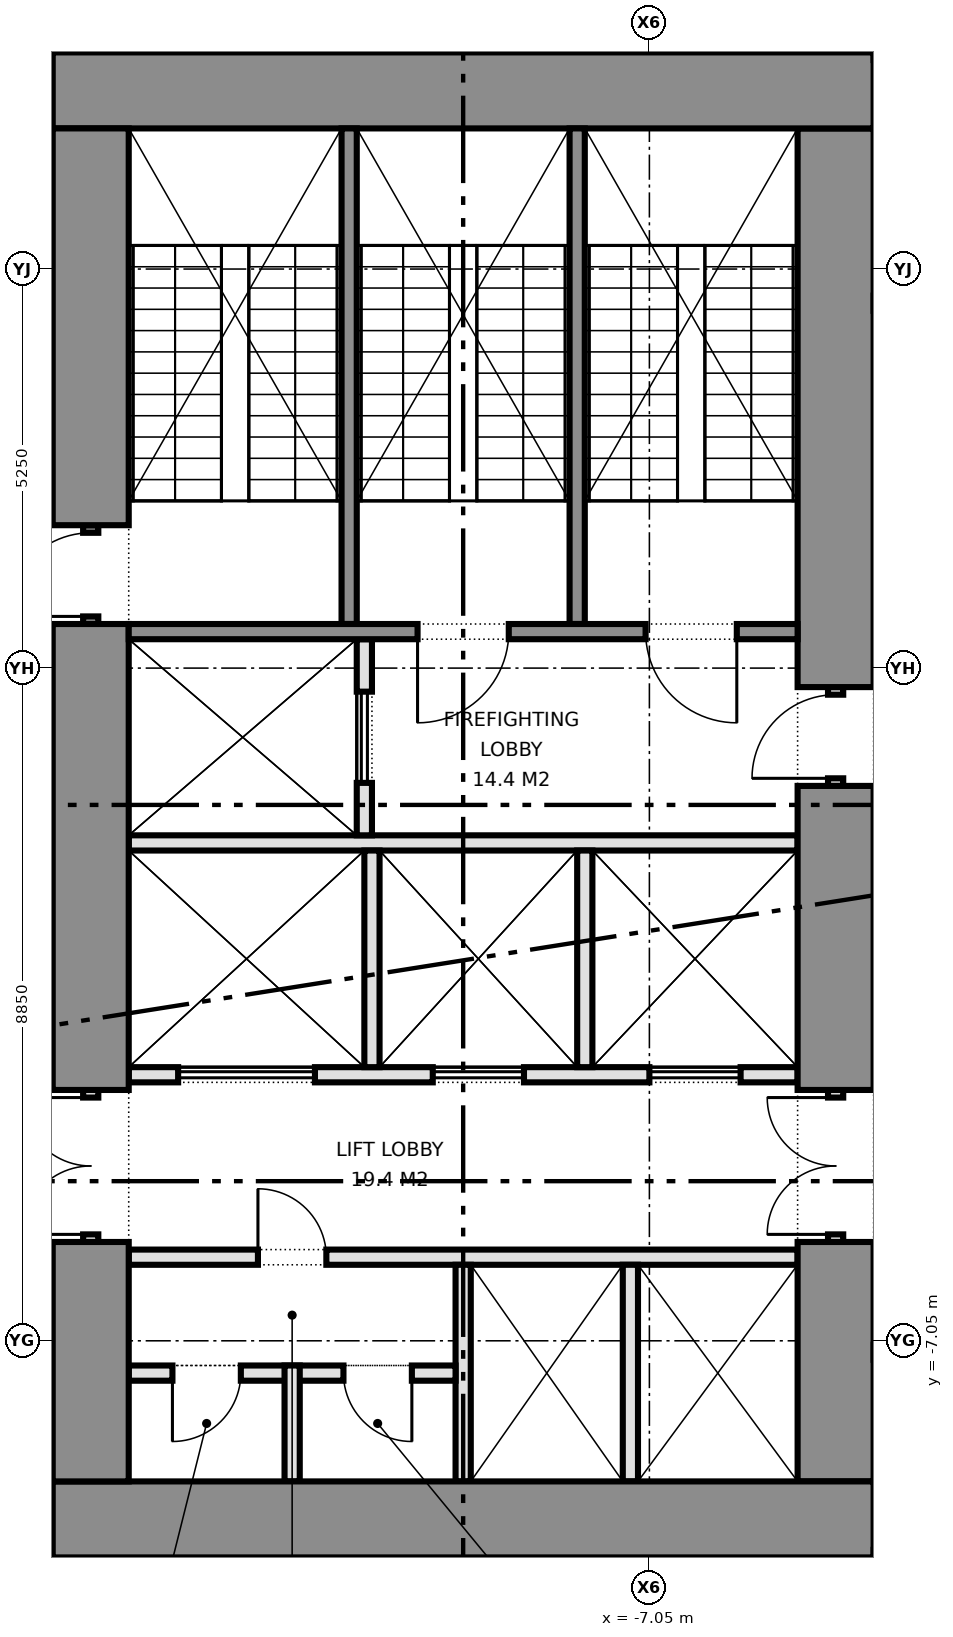
"""IFC4 building model, lengths in metres.
Left out: names, types, materials, properties, quantities, classifications, styles, units other than length and angle.
Written with IfcOpenShell. Run it as: python <this file> out.ifc"""

import sys

from ifc_helpers import new_model, si_unit, direction, frame, frame_2d, origin, place, context, subcontext, project, spatial, rectangle, extrude, element, fill, save


model = new_model("IFC4")
c1 = context("Model", 3, precision=1e-05, world=origin(), true_north=direction((0.0, 1.0)))
c2 = subcontext(c1, "Body", "Model", "MODEL_VIEW")
j1 = project(units=[si_unit("LENGTHUNIT", "METRE"), si_unit("PLANEANGLEUNIT", "RADIAN")], contexts=[c1])
p1 = place(None, origin())
s1 = spatial("IfcSite", under=j1, at=p1, CompositionType="ELEMENT")
p2 = place(p1, origin())
s2 = spatial("IfcBuilding", under=s1, at=p2, CompositionType="ELEMENT")
p3 = place(p2, frame((0.0, 0.0, 108.4)))
s3 = spatial("IfcBuildingStorey", under=s2, at=p3, CompositionType="ELEMENT", Elevation=108.4)
for number, where, z_axis, x_axis in (
    (1, (-14.9, -9.4, 0.0), (0.0, 0.0, 1.0), (1.0, 0.0, 0.0)),
    (2, (-14.9, 9.4, 0.0), (0.0, 0.0, 1.0), (1.0, 0.0, 0.0)),
):
    element("IfcWall", number, at=place(p3, frame(where, z_axis=z_axis, x_axis=x_axis)), inside=s3, PredefinedType="SHEAR", context=c2, shape_type="SweptSolid", body=[
        extrude(rectangle(XDim=10.8, YDim=1.0, at=frame_2d((5.4, 0.0))), origin(), (0.0, 0.0, 1.0), 4.15),
    ])
p4 = place(p3, frame((-14.4, -8.9, 0.0), z_axis=(0.0, 0.0, 1.0), x_axis=(0.0, 1.0, 0.0)))
e3 = element("IfcWall", 3, at=p4, inside=s3, PredefinedType="SHEAR", context=c2, shape_type="SweptSolid", body=[
    extrude(rectangle(XDim=3.15, YDim=1.0, at=frame_2d((1.575, 0.0))), origin(), (0.0, 0.0, 1.0), 4.15),
])
p5 = place(p3, frame((-14.4, -5.75, 0.0), z_axis=(0.0, 0.0, 1.0), x_axis=(0.0, 1.0, 0.0)))
e4 = element("IfcWall", 4, at=p5, inside=s3, PredefinedType="PARTITIONING", context=c2, shape_type="SweptSolid", body=[
    extrude(rectangle(XDim=2.0, YDim=0.2, at=frame_2d((1.0, 0.0))), origin(), (0.0, 0.0, 1.0), 2.4),
])
p6 = place(p5, frame((0.1, 0.0, 0.0)))
e5 = element("IfcOpeningElement", 5, at=p6, cuts=e4, PredefinedType="OPENING", context=c2, shape_type="SweptSolid", body=[
    extrude(rectangle(XDim=1.8, YDim=2.1, at=frame_2d((0.9, 1.05))), frame((0.0, 0.11, 0.0), z_axis=(0.0, -1.0, 0.0), x_axis=(1.0, 0.0, 0.0)), (0.0, 0.0, 1.0), 0.22),
])
p7 = place(p3, frame((-14.4, -3.75, 0.0), z_axis=(0.0, 0.0, 1.0), x_axis=(0.0, 1.0, 0.0)))
e6 = element("IfcWall", 6, at=p7, inside=s3, PredefinedType="SHEAR", context=c2, shape_type="SweptSolid", body=[
    extrude(rectangle(XDim=6.13, YDim=1.0, at=frame_2d((3.065, 0.0))), origin(), (0.0, 0.0, 1.0), 4.15),
])
p8 = place(p3, frame((-14.4, 2.38, 0.0), z_axis=(0.0, 0.0, 1.0), x_axis=(0.0, 1.0, 0.0)))
e7 = element("IfcWall", 7, at=p8, inside=s3, PredefinedType="SHEAR", context=c2, shape_type="SweptSolid", body=[
    extrude(rectangle(XDim=1.3, YDim=0.2, at=frame_2d((0.65, 0.0))), origin(), (0.0, 0.0, 1.0), 2.4),
])
p9 = place(p8, frame((0.1, 0.0, 0.0)))
e8 = element("IfcOpeningElement", 8, at=p9, cuts=e7, PredefinedType="OPENING", context=c2, shape_type="SweptSolid", body=[
    extrude(rectangle(XDim=1.1, YDim=2.1, at=frame_2d((0.55, 1.05))), frame((0.0, 0.11, 0.0), z_axis=(0.0, -1.0, 0.0), x_axis=(1.0, 0.0, 0.0)), (0.0, 0.0, 1.0), 0.22),
])
p10 = place(p3, frame((-14.4, 3.68, 0.0), z_axis=(0.0, 0.0, 1.0), x_axis=(0.0, 1.0, 0.0)))
e9 = element("IfcWall", 9, at=p10, inside=s3, PredefinedType="SHEAR", context=c2, shape_type="SweptSolid", body=[
    extrude(rectangle(XDim=5.22, YDim=1.0, at=frame_2d((2.61, 0.0))), origin(), (0.0, 0.0, 1.0), 4.15),
])
p11 = place(p3, frame((-4.6, -8.9, 0.0), z_axis=(0.0, 0.0, 1.0), x_axis=(0.0, 1.0, 0.0)))
e10 = element("IfcWall", 10, at=p11, inside=s3, PredefinedType="SHEAR", context=c2, shape_type="SweptSolid", body=[
    extrude(rectangle(XDim=3.15, YDim=1.0, at=frame_2d((1.575, 0.0))), origin(), (0.0, 0.0, 1.0), 4.15),
])
p12 = place(p3, frame((-4.6, -5.75, 0.0), z_axis=(0.0, 0.0, 1.0), x_axis=(0.0, 1.0, 0.0)))
e11 = element("IfcWall", 11, at=p12, inside=s3, PredefinedType="PARTITIONING", context=c2, shape_type="SweptSolid", body=[
    extrude(rectangle(XDim=2.0, YDim=0.2, at=frame_2d((1.0, 0.0))), origin(), (0.0, 0.0, 1.0), 2.4),
])
p13 = place(p12, frame((0.1, 0.0, 0.0)))
e12 = element("IfcOpeningElement", 12, at=p13, cuts=e11, PredefinedType="OPENING", context=c2, shape_type="SweptSolid", body=[
    extrude(rectangle(XDim=1.8, YDim=2.1, at=frame_2d((0.9, 1.05))), frame((0.0, 0.11, 0.0), z_axis=(0.0, -1.0, 0.0), x_axis=(1.0, 0.0, 0.0)), (0.0, 0.0, 1.0), 0.22),
])
p14 = place(p3, frame((-4.6, -3.75, 0.0), z_axis=(0.0, 0.0, 1.0), x_axis=(0.0, 1.0, 0.0)))
e13 = element("IfcWall", 13, at=p14, inside=s3, PredefinedType="SHEAR", context=c2, shape_type="SweptSolid", body=[
    extrude(rectangle(XDim=4.0, YDim=1.0, at=frame_2d((2.0, 0.0))), origin(), (0.0, 0.0, 1.0), 4.15),
])
p15 = place(p3, frame((-4.6, 0.25, 0.0), z_axis=(0.0, 0.0, 1.0), x_axis=(0.0, 1.0, 0.0)))
e14 = element("IfcWall", 14, at=p15, inside=s3, PredefinedType="PARTITIONING", context=c2, shape_type="SweptSolid", body=[
    extrude(rectangle(XDim=1.3, YDim=0.2, at=frame_2d((0.65, 0.0))), origin(), (0.0, 0.0, 1.0), 2.4),
])
p16 = place(p15, frame((0.1, 0.0, 0.0)))
e15 = element("IfcOpeningElement", 15, at=p16, cuts=e14, PredefinedType="OPENING", context=c2, shape_type="SweptSolid", body=[
    extrude(rectangle(XDim=1.1, YDim=2.1, at=frame_2d((0.55, 1.05))), frame((0.0, 0.11, 0.0), z_axis=(0.0, -1.0, 0.0), x_axis=(1.0, 0.0, 0.0)), (0.0, 0.0, 1.0), 0.22),
])
p17 = place(p3, frame((-4.6, 1.55, 0.0), z_axis=(0.0, 0.0, 1.0), x_axis=(0.0, 1.0, 0.0)))
e16 = element("IfcWall", 16, at=p17, inside=s3, PredefinedType="SHEAR", context=c2, shape_type="SweptSolid", body=[
    extrude(rectangle(XDim=7.35, YDim=1.0, at=frame_2d((3.675, 0.0))), origin(), (0.0, 0.0, 1.0), 4.15),
])
p18 = place(p3, frame((-13.9, -5.95, 0.0), z_axis=(0.0, 0.0, 1.0), x_axis=(1.0, 0.0, 0.0)))
e17 = element("IfcWall", 17, at=p18, inside=s3, PredefinedType="PARTITIONING", context=c2, shape_type="SweptSolid", body=[
    extrude(rectangle(XDim=8.8, YDim=0.2, at=frame_2d((4.4, 0.0))), origin(), (0.0, 0.0, 1.0), 4.15),
])
p19 = place(p18, frame((1.7, 0.0, 0.0)))
e18 = element("IfcOpeningElement", 18, at=p19, cuts=e17, PredefinedType="OPENING", context=c2, shape_type="SweptSolid", body=[
    extrude(rectangle(XDim=0.9, YDim=2.1, at=frame_2d((0.45, 1.05))), frame((0.0, 0.11, 0.0), z_axis=(0.0, -1.0, 0.0), x_axis=(1.0, 0.0, 0.0)), (0.0, 0.0, 1.0), 0.22),
])
p20 = place(p3, frame((-13.9, -3.55, 0.0), z_axis=(0.0, 0.0, 1.0), x_axis=(1.0, 0.0, 0.0)))
e19 = element("IfcWall", 19, at=p20, inside=s3, PredefinedType="PARTITIONING", context=c2, shape_type="SweptSolid", body=[
    extrude(rectangle(XDim=8.8, YDim=0.2, at=frame_2d((4.4, 0.0))), origin(), (0.0, 0.0, 1.0), 4.15),
])
p21 = place(p20, frame((0.65, 0.0, 0.0)))
e20 = element("IfcOpeningElement", 20, at=p21, cuts=e19, PredefinedType="OPENING", context=c2, shape_type="SweptSolid", body=[
    extrude(rectangle(XDim=1.8, YDim=2.1, at=frame_2d((0.9, 1.05))), frame((0.0, 0.11, 0.0), z_axis=(0.0, -1.0, 0.0), x_axis=(1.0, 0.0, 0.0)), (0.0, 0.0, 1.0), 0.22),
])
p22 = place(p20, frame((4.0, 0.0, 0.0)))
e21 = element("IfcOpeningElement", 21, at=p22, cuts=e19, PredefinedType="OPENING", context=c2, shape_type="SweptSolid", body=[
    extrude(rectangle(XDim=1.2, YDim=2.1, at=frame_2d((0.6, 1.05))), frame((0.0, 0.11, 0.0), z_axis=(0.0, -1.0, 0.0), x_axis=(1.0, 0.0, 0.0)), (0.0, 0.0, 1.0), 0.22),
])
p23 = place(p20, frame((6.85, 0.0, 0.0)))
e22 = element("IfcOpeningElement", 22, at=p23, cuts=e19, PredefinedType="OPENING", context=c2, shape_type="SweptSolid", body=[
    extrude(rectangle(XDim=1.2, YDim=2.1, at=frame_2d((0.6, 1.05))), frame((0.0, 0.11, 0.0), z_axis=(0.0, -1.0, 0.0), x_axis=(1.0, 0.0, 0.0)), (0.0, 0.0, 1.0), 0.22),
])
p24 = place(p3, frame((-13.9, -0.5, 0.0), z_axis=(0.0, 0.0, 1.0), x_axis=(1.0, 0.0, 0.0)))
e23 = element("IfcWall", 23, at=p24, inside=s3, PredefinedType="PARTITIONING", context=c2, shape_type="SweptSolid", body=[
    extrude(rectangle(XDim=8.8, YDim=0.2, at=frame_2d((4.4, 0.0))), origin(), (0.0, 0.0, 1.0), 4.15),
])
p25 = place(p3, frame((-10.8, -0.4, 0.0), z_axis=(0.0, 0.0, 1.0), x_axis=(0.0, 1.0, 0.0)))
e24 = element("IfcWall", 24, at=p25, inside=s3, PredefinedType="PARTITIONING", context=c2, shape_type="SweptSolid", body=[
    extrude(rectangle(XDim=2.58, YDim=0.2, at=frame_2d((1.29, 0.0))), origin(), (0.0, 0.0, 1.0), 4.15),
])
p26 = place(p25, frame((0.69, 0.0, 0.0)))
e25 = element("IfcOpeningElement", 25, at=p26, cuts=e24, PredefinedType="OPENING", context=c2, shape_type="SweptSolid", body=[
    extrude(rectangle(XDim=1.2, YDim=2.1, at=frame_2d((0.6, 1.05))), frame((0.0, 0.11, 0.0), z_axis=(0.0, -1.0, 0.0), x_axis=(1.0, 0.0, 0.0)), (0.0, 0.0, 1.0), 0.22),
])
p27 = place(p3, frame((-13.9, 2.28, 0.0), z_axis=(0.0, 0.0, 1.0), x_axis=(1.0, 0.0, 0.0)))
e26 = element("IfcWall", 26, at=p27, inside=s3, PredefinedType="SHEAR", context=c2, shape_type="SweptSolid", body=[
    extrude(rectangle(XDim=8.8, YDim=0.2, at=frame_2d((4.4, 0.0))), origin(), (0.0, 0.0, 1.0), 4.15),
])
p28 = place(p27, frame((3.8, 0.0, 0.0)))
e27 = element("IfcOpeningElement", 27, at=p28, cuts=e26, PredefinedType="OPENING", context=c2, shape_type="SweptSolid", body=[
    extrude(rectangle(XDim=1.2, YDim=2.1, at=frame_2d((0.6, 1.05))), frame((0.0, 0.11, 0.0), z_axis=(0.0, -1.0, 0.0), x_axis=(1.0, 0.0, 0.0)), (0.0, 0.0, 1.0), 0.22),
])
p29 = place(p27, frame((6.8, 0.0, 0.0)))
e28 = element("IfcOpeningElement", 28, at=p29, cuts=e26, PredefinedType="OPENING", context=c2, shape_type="SweptSolid", body=[
    extrude(rectangle(XDim=1.2, YDim=2.1, at=frame_2d((0.6, 1.05))), frame((0.0, 0.11, 0.0), z_axis=(0.0, -1.0, 0.0), x_axis=(1.0, 0.0, 0.0)), (0.0, 0.0, 1.0), 0.22),
])
for number, where, z_axis, x_axis in (
    (29, (-11.0, 2.38, 0.0), (0.0, 0.0, 1.0), (0.0, 1.0, 0.0)),
    (30, (-8.0, 2.38, 0.0), (0.0, 0.0, 1.0), (0.0, 1.0, 0.0)),
):
    element("IfcWall", number, at=place(p3, frame(where, z_axis=z_axis, x_axis=x_axis)), inside=s3, PredefinedType="SHEAR", context=c2, shape_type="SweptSolid", body=[
        extrude(rectangle(XDim=6.52, YDim=0.2, at=frame_2d((3.26, 0.0))), origin(), (0.0, 0.0, 1.0), 4.15),
    ])
for number, where, z_axis, x_axis in (
    (31, (-9.5, -8.9, 0.0), (0.0, 0.0, 1.0), (0.0, 1.0, 0.0)),
    (32, (-7.3, -8.9, 0.0), (0.0, 0.0, 1.0), (0.0, 1.0, 0.0)),
):
    element("IfcWall", number, at=place(p3, frame(where, z_axis=z_axis, x_axis=x_axis)), inside=s3, PredefinedType="PARTITIONING", context=c2, shape_type="SweptSolid", body=[
        extrude(rectangle(XDim=2.85, YDim=0.2, at=frame_2d((1.425, 0.0))), origin(), (0.0, 0.0, 1.0), 4.15),
    ])
p30 = place(p3, frame((-13.9, -7.475, 0.0), z_axis=(0.0, 0.0, 1.0), x_axis=(1.0, 0.0, 0.0)))
e33 = element("IfcWall", 33, at=p30, inside=s3, PredefinedType="PARTITIONING", context=c2, shape_type="SweptSolid", body=[
    extrude(rectangle(XDim=4.3, YDim=0.2, at=frame_2d((2.15, 0.0))), origin(), (0.0, 0.0, 1.0), 4.15),
])
p31 = place(p30, frame((0.575, 0.0, 0.0)))
e34 = element("IfcOpeningElement", 34, at=p31, cuts=e33, PredefinedType="OPENING", context=c2, shape_type="SweptSolid", body=[
    extrude(rectangle(XDim=0.9, YDim=2.1, at=frame_2d((0.45, 1.05))), frame((0.0, 0.11, 0.0), z_axis=(0.0, -1.0, 0.0), x_axis=(1.0, 0.0, 0.0)), (0.0, 0.0, 1.0), 0.22),
])
p32 = place(p30, frame((2.825, 0.0, 0.0)))
e35 = element("IfcOpeningElement", 35, at=p32, cuts=e33, PredefinedType="OPENING", context=c2, shape_type="SweptSolid", body=[
    extrude(rectangle(XDim=0.9, YDim=2.1, at=frame_2d((0.45, 1.05))), frame((0.0, 0.11, 0.0), z_axis=(0.0, -1.0, 0.0), x_axis=(1.0, 0.0, 0.0)), (0.0, 0.0, 1.0), 0.22),
])
p33 = place(p3, frame((-11.75, -8.9, 0.0), z_axis=(0.0, 0.0, 1.0), x_axis=(0.0, 1.0, 0.0)))
e36 = element("IfcWall", 36, at=p33, inside=s3, PredefinedType="PARTITIONING", context=c2, shape_type="SweptSolid", body=[
    extrude(rectangle(XDim=1.525, YDim=0.2, at=frame_2d((0.762, 0.0))), origin(), (0.0, 0.0, 1.0), 4.15),
])
for number, where, z_axis, x_axis in (
    (37, (-10.7, -3.45, 0.0), (0.0, 0.0, 1.0), (0.0, 1.0, 0.0)),
    (38, (-7.9, -3.45, 0.0), (0.0, 0.0, 1.0), (0.0, 1.0, 0.0)),
):
    element("IfcWall", number, at=place(p3, frame(where, z_axis=z_axis, x_axis=x_axis)), inside=s3, PredefinedType="PARTITIONING", context=c2, shape_type="SweptSolid", body=[
        extrude(rectangle(XDim=2.85, YDim=0.2, at=frame_2d((1.425, 0.0))), origin(), (0.0, 0.0, 1.0), 4.15),
    ])
p34 = place(p6, origin())
e39 = element("IfcDoor", 39, at=p34, inside=s3, OperationType="DOUBLE_DOOR_SINGLE_SWING", PredefinedType="DOOR", context=c2, shape_type="SweptSolid", body=[
    extrude(rectangle(XDim=1.8, YDim=2.1, at=frame_2d((0.9, 1.05))), frame((0.0, 0.025, 0.0), z_axis=(0.0, -1.0, 0.0), x_axis=(1.0, 0.0, 0.0)), (0.0, 0.0, 1.0), 0.05),
])
fill(e5, e39)
p35 = place(p9, origin())
e40 = element("IfcDoor", 40, at=p35, inside=s3, OperationType="SINGLE_SWING_LEFT", PredefinedType="DOOR", context=c2, shape_type="SweptSolid", body=[
    extrude(rectangle(XDim=1.1, YDim=2.1, at=frame_2d((0.55, 1.05))), frame((0.0, 0.025, 0.0), z_axis=(0.0, -1.0, 0.0), x_axis=(1.0, 0.0, 0.0)), (0.0, 0.0, 1.0), 0.05),
])
fill(e8, e40)
p36 = place(p13, origin())
e41 = element("IfcDoor", 41, at=p36, inside=s3, OperationType="DOUBLE_DOOR_SINGLE_SWING", PredefinedType="DOOR", context=c2, shape_type="SweptSolid", body=[
    extrude(rectangle(XDim=1.8, YDim=2.1, at=frame_2d((0.9, 1.05))), frame((0.0, 0.025, 0.0), z_axis=(0.0, -1.0, 0.0), x_axis=(1.0, 0.0, 0.0)), (0.0, 0.0, 1.0), 0.05),
])
fill(e12, e41)
p37 = place(p16, origin())
e42 = element("IfcDoor", 42, at=p37, inside=s3, OperationType="SINGLE_SWING_LEFT", PredefinedType="DOOR", context=c2, shape_type="SweptSolid", body=[
    extrude(rectangle(XDim=1.1, YDim=2.1, at=frame_2d((0.55, 1.05))), frame((0.0, 0.025, 0.0), z_axis=(0.0, -1.0, 0.0), x_axis=(1.0, 0.0, 0.0)), (0.0, 0.0, 1.0), 0.05),
])
fill(e15, e42)
p38 = place(p21, origin())
e43 = element("IfcDoor", 43, at=p38, inside=s3, OperationType="DOUBLE_DOOR_SLIDING", PredefinedType="DOOR", context=c2, shape_type="SweptSolid", body=[
    extrude(rectangle(XDim=1.8, YDim=2.1, at=frame_2d((0.9, 1.05))), frame((0.0, 0.025, 0.0), z_axis=(0.0, -1.0, 0.0), x_axis=(1.0, 0.0, 0.0)), (0.0, 0.0, 1.0), 0.05),
])
fill(e20, e43)
p39 = place(p22, origin())
e44 = element("IfcDoor", 44, at=p39, inside=s3, OperationType="DOUBLE_DOOR_SLIDING", PredefinedType="DOOR", context=c2, shape_type="SweptSolid", body=[
    extrude(rectangle(XDim=1.2, YDim=2.1, at=frame_2d((0.6, 1.05))), frame((0.0, 0.025, 0.0), z_axis=(0.0, -1.0, 0.0), x_axis=(1.0, 0.0, 0.0)), (0.0, 0.0, 1.0), 0.05),
])
fill(e21, e44)
p40 = place(p23, origin())
e45 = element("IfcDoor", 45, at=p40, inside=s3, OperationType="DOUBLE_DOOR_SLIDING", PredefinedType="DOOR", context=c2, shape_type="SweptSolid", body=[
    extrude(rectangle(XDim=1.2, YDim=2.1, at=frame_2d((0.6, 1.05))), frame((0.0, 0.025, 0.0), z_axis=(0.0, -1.0, 0.0), x_axis=(1.0, 0.0, 0.0)), (0.0, 0.0, 1.0), 0.05),
])
fill(e22, e45)
p41 = place(p26, origin())
e46 = element("IfcDoor", 46, at=p41, inside=s3, OperationType="DOUBLE_DOOR_SLIDING", PredefinedType="DOOR", context=c2, shape_type="SweptSolid", body=[
    extrude(rectangle(XDim=1.2, YDim=2.1, at=frame_2d((0.6, 1.05))), frame((0.0, 0.025, 0.0), z_axis=(0.0, -1.0, 0.0), x_axis=(1.0, 0.0, 0.0)), (0.0, 0.0, 1.0), 0.05),
])
fill(e25, e46)
p42 = place(p19, origin())
e47 = element("IfcDoor", 47, at=p42, inside=s3, OperationType="SINGLE_SWING_LEFT", PredefinedType="DOOR", context=c2, shape_type="SweptSolid", body=[
    extrude(rectangle(XDim=0.9, YDim=2.1, at=frame_2d((0.45, 1.05))), frame((0.0, 0.025, 0.0), z_axis=(0.0, -1.0, 0.0), x_axis=(1.0, 0.0, 0.0)), (0.0, 0.0, 1.0), 0.05),
])
fill(e18, e47)
p43 = place(p31, frame((0.9, 0.0, 0.0), z_axis=(0.0, 0.0, 1.0), x_axis=(-1.0, 0.0, 0.0)))
e48 = element("IfcDoor", 48, at=p43, inside=s3, OperationType="SINGLE_SWING_RIGHT", PredefinedType="DOOR", context=c2, shape_type="SweptSolid", body=[
    extrude(rectangle(XDim=0.9, YDim=2.1, at=frame_2d((0.45, 1.05))), frame((0.0, 0.025, 0.0), z_axis=(0.0, -1.0, 0.0), x_axis=(1.0, 0.0, 0.0)), (0.0, 0.0, 1.0), 0.05),
])
fill(e34, e48)
p44 = place(p32, frame((0.9, 0.0, 0.0), z_axis=(0.0, 0.0, 1.0), x_axis=(-1.0, 0.0, 0.0)))
e49 = element("IfcDoor", 49, at=p44, inside=s3, OperationType="SINGLE_SWING_LEFT", PredefinedType="DOOR", context=c2, shape_type="SweptSolid", body=[
    extrude(rectangle(XDim=0.9, YDim=2.1, at=frame_2d((0.45, 1.05))), frame((0.0, 0.025, 0.0), z_axis=(0.0, -1.0, 0.0), x_axis=(1.0, 0.0, 0.0)), (0.0, 0.0, 1.0), 0.05),
])
fill(e35, e49)
p45 = place(p28, frame((1.2, 0.0, 0.0), z_axis=(0.0, 0.0, 1.0), x_axis=(-1.0, 0.0, 0.0)))
e50 = element("IfcDoor", 50, at=p45, inside=s3, OperationType="SINGLE_SWING_RIGHT", PredefinedType="DOOR", context=c2, shape_type="SweptSolid", body=[
    extrude(rectangle(XDim=1.2, YDim=2.1, at=frame_2d((0.6, 1.05))), frame((0.0, 0.025, 0.0), z_axis=(0.0, -1.0, 0.0), x_axis=(1.0, 0.0, 0.0)), (0.0, 0.0, 1.0), 0.05),
])
fill(e27, e50)
p46 = place(p29, frame((1.2, 0.0, 0.0), z_axis=(0.0, 0.0, 1.0), x_axis=(-1.0, 0.0, 0.0)))
e51 = element("IfcDoor", 51, at=p46, inside=s3, OperationType="SINGLE_SWING_LEFT", PredefinedType="DOOR", context=c2, shape_type="SweptSolid", body=[
    extrude(rectangle(XDim=1.2, YDim=2.1, at=frame_2d((0.6, 1.05))), frame((0.0, 0.025, 0.0), z_axis=(0.0, -1.0, 0.0), x_axis=(1.0, 0.0, 0.0)), (0.0, 0.0, 1.0), 0.05),
])
fill(e28, e51)
save(model, sys.argv[1])
